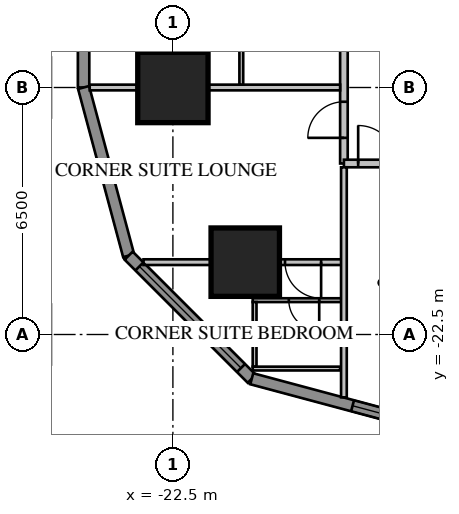
"""IFC4 building model, lengths in metres.
Left out: names, types, materials, properties, quantities, classifications, styles, units other than length and angle.
Written with IfcOpenShell. Run it as: python <this file> out.ifc"""

import sys

from ifc_helpers import new_model, si_unit, direction, frame, frame_2d, origin, origin_2d, place, context, subcontext, project, spatial, rectangle, extrude, element, fill, save


model = new_model("IFC4")
c1 = context("Model", 3, precision=1e-05, world=origin(), true_north=direction((0.0, 1.0)))
c2 = subcontext(c1, "Body", "Model", "MODEL_VIEW")
j1 = project(units=[si_unit("LENGTHUNIT", "METRE"), si_unit("PLANEANGLEUNIT", "RADIAN")], contexts=[c1])
p1 = place(None, origin())
s1 = spatial("IfcSite", under=j1, at=p1, CompositionType="ELEMENT")
p2 = place(p1, origin())
s2 = spatial("IfcBuilding", under=s1, at=p2, CompositionType="ELEMENT")
p3 = place(p2, frame((0.0, 0.0, 42.95)))
s3 = spatial("IfcBuildingStorey", under=s2, at=p3, CompositionType="ELEMENT", Elevation=42.95)
p4 = place(p3, frame((-22.5, -16.0, 0.0), z_axis=(0.0, 0.0, 1.0), x_axis=(1.0, 0.0, 0.0)))
e1 = element("IfcColumn", 1, at=p4, inside=s3, PredefinedType="COLUMN", context=c2, shape_type="SweptSolid", body=[
    extrude(rectangle(XDim=1.85, YDim=1.85, at=origin_2d()), origin(), (0.0, 0.0, 1.0), 3.85),
])
p5 = place(p3, frame((-20.596, -20.596, 0.0), z_axis=(0.0, 0.0, 1.0), x_axis=(1.0, 0.0, 0.0)))
e2 = element("IfcColumn", 2, at=p5, inside=s3, PredefinedType="COLUMN", context=c2, shape_type="SweptSolid", body=[
    extrude(rectangle(XDim=1.8, YDim=1.8, at=origin_2d()), origin(), (0.0, 0.0, 1.0), 3.85),
])
p6 = place(p3, frame((-24.85, 16.0, 0.0), z_axis=(0.0, 0.0, 1.0), x_axis=(0.0, -1.0, 0.0)))
e3 = element("IfcWall", 3, at=p6, inside=s3, PredefinedType="SOLIDWALL", context=c2, shape_type="SweptSolid", body=[
    extrude(rectangle(XDim=32.0, YDim=0.3, at=frame_2d((16.0, 0.0))), origin(), (0.0, 0.0, 1.0), 3.65),
])
p7 = place(p6, frame((1.2, 0.0, 0.75)))
e4 = element("IfcOpeningElement", 4, at=p7, cuts=e3, PredefinedType="OPENING", context=c2, shape_type="SweptSolid", body=[
    extrude(rectangle(XDim=1.6, YDim=1.8, at=frame_2d((0.8, 0.9))), frame((0.0, 0.17, 0.0), z_axis=(0.0, -1.0, 0.0), x_axis=(1.0, 0.0, 0.0)), (0.0, 0.0, 1.0), 0.34),
])
p8 = place(p6, frame((5.2, 0.0, 0.75)))
e5 = element("IfcOpeningElement", 5, at=p8, cuts=e3, PredefinedType="OPENING", context=c2, shape_type="SweptSolid", body=[
    extrude(rectangle(XDim=1.6, YDim=1.8, at=frame_2d((0.8, 0.9))), frame((0.0, 0.17, 0.0), z_axis=(0.0, -1.0, 0.0), x_axis=(1.0, 0.0, 0.0)), (0.0, 0.0, 1.0), 0.34),
])
p9 = place(p6, frame((17.2, 0.0, 0.75)))
e6 = element("IfcOpeningElement", 6, at=p9, cuts=e3, PredefinedType="OPENING", context=c2, shape_type="SweptSolid", body=[
    extrude(rectangle(XDim=1.6, YDim=1.8, at=frame_2d((0.8, 0.9))), frame((0.0, 0.17, 0.0), z_axis=(0.0, -1.0, 0.0), x_axis=(1.0, 0.0, 0.0)), (0.0, 0.0, 1.0), 0.34),
])
p10 = place(p6, frame((21.2, 0.0, 0.75)))
e7 = element("IfcOpeningElement", 7, at=p10, cuts=e3, PredefinedType="OPENING", context=c2, shape_type="SweptSolid", body=[
    extrude(rectangle(XDim=1.6, YDim=1.8, at=frame_2d((0.8, 0.9))), frame((0.0, 0.17, 0.0), z_axis=(0.0, -1.0, 0.0), x_axis=(1.0, 0.0, 0.0)), (0.0, 0.0, 1.0), 0.34),
])
p11 = place(p6, frame((25.2, 0.0, 0.75)))
e8 = element("IfcOpeningElement", 8, at=p11, cuts=e3, PredefinedType="OPENING", context=c2, shape_type="SweptSolid", body=[
    extrude(rectangle(XDim=1.6, YDim=1.8, at=frame_2d((0.8, 0.9))), frame((0.0, 0.17, 0.0), z_axis=(0.0, -1.0, 0.0), x_axis=(1.0, 0.0, 0.0)), (0.0, 0.0, 1.0), 0.34),
])
p12 = place(p6, frame((29.2, 0.0, 0.75)))
e9 = element("IfcOpeningElement", 9, at=p12, cuts=e3, PredefinedType="OPENING", context=c2, shape_type="SweptSolid", body=[
    extrude(rectangle(XDim=1.6, YDim=1.8, at=frame_2d((0.8, 0.9))), frame((0.0, 0.17, 0.0), z_axis=(0.0, -1.0, 0.0), x_axis=(1.0, 0.0, 0.0)), (0.0, 0.0, 1.0), 0.34),
])
p13 = place(p6, frame((8.8, 0.0, 0.75)))
e10 = element("IfcOpeningElement", 10, at=p13, cuts=e3, PredefinedType="OPENING", context=c2, shape_type="SweptSolid", body=[
    extrude(rectangle(XDim=2.4, YDim=1.8, at=frame_2d((1.2, 0.9))), frame((0.0, 0.17, 0.0), z_axis=(0.0, -1.0, 0.0), x_axis=(1.0, 0.0, 0.0)), (0.0, 0.0, 1.0), 0.34),
])
p14 = place(p6, frame((13.812, 0.0, 0.0)))
e11 = element("IfcOpeningElement", 11, at=p14, cuts=e3, PredefinedType="OPENING", context=c2, shape_type="SweptSolid", body=[
    extrude(rectangle(XDim=1.0, YDim=2.4, at=frame_2d((0.5, 1.2))), frame((0.0, 0.17, 0.0), z_axis=(0.0, -1.0, 0.0), x_axis=(1.0, 0.0, 0.0)), (0.0, 0.0, 1.0), 0.34),
])
p15 = place(p3, frame((-24.85, -16.0, 0.0), z_axis=(0.0, 0.0, 1.0), x_axis=(0.258839972501, -0.965920218567, 0.0)))
e12 = element("IfcWall", 12, at=p15, inside=s3, PredefinedType="SOLIDWALL", context=c2, shape_type="SweptSolid", body=[
    extrude(rectangle(XDim=4.581, YDim=0.3, at=frame_2d((2.291, 0.0))), origin(), (0.0, 0.0, 1.0), 3.65),
])
p16 = place(p3, frame((-23.664, -20.425, 0.0), z_axis=(0.0, 0.0, 1.0), x_axis=(0.707106781187, -0.707106781187, 0.0)))
e13 = element("IfcWall", 13, at=p16, inside=s3, PredefinedType="SOLIDWALL", context=c2, shape_type="SweptSolid", body=[
    extrude(rectangle(XDim=4.581, YDim=0.3, at=frame_2d((2.291, 0.0))), origin(), (0.0, 0.0, 1.0), 3.65),
])
p17 = place(p16, frame((0.4, 0.0, 0.75)))
e14 = element("IfcOpeningElement", 14, at=p17, cuts=e13, PredefinedType="OPENING", context=c2, shape_type="SweptSolid", body=[
    extrude(rectangle(XDim=3.781, YDim=1.8, at=frame_2d((1.891, 0.9))), frame((0.0, 0.17, 0.0), z_axis=(0.0, -1.0, 0.0), x_axis=(1.0, 0.0, 0.0)), (0.0, 0.0, 1.0), 0.34),
])
p18 = place(p3, frame((-20.425, -23.664, 0.0), z_axis=(0.0, 0.0, 1.0), x_axis=(0.965920218567, -0.258839972501, 0.0)))
e15 = element("IfcWall", 15, at=p18, inside=s3, PredefinedType="SOLIDWALL", context=c2, shape_type="SweptSolid", body=[
    extrude(rectangle(XDim=4.581, YDim=0.3, at=frame_2d((2.291, 0.0))), origin(), (0.0, 0.0, 1.0), 3.65),
])
p19 = place(p18, frame((2.746, 0.0, 0.75)))
e16 = element("IfcOpeningElement", 16, at=p19, cuts=e15, PredefinedType="OPENING", context=c2, shape_type="SweptSolid", body=[
    extrude(rectangle(XDim=1.6, YDim=1.8, at=frame_2d((0.8, 0.9))), frame((0.0, 0.17, 0.0), z_axis=(0.0, -1.0, 0.0), x_axis=(1.0, 0.0, 0.0)), (0.0, 0.0, 1.0), 0.34),
])
p20 = place(p3, frame((-18.0, 18.0, 0.0), z_axis=(0.0, 0.0, 1.0), x_axis=(0.0, -1.0, 0.0)))
e17 = element("IfcWall", 17, at=p20, inside=s3, PredefinedType="PARTITIONING", context=c2, shape_type="SweptSolid", body=[
    extrude(rectangle(XDim=36.0, YDim=0.2, at=frame_2d((18.0, 0.0))), origin(), (0.0, 0.0, 1.0), 3.65),
])
p21 = place(p20, frame((0.375, 0.0, 0.0)))
e18 = element("IfcOpeningElement", 18, at=p21, cuts=e17, PredefinedType="OPENING", context=c2, shape_type="SweptSolid", body=[
    extrude(rectangle(XDim=1.0, YDim=2.1, at=frame_2d((0.5, 1.05))), frame((0.0, 0.12, 0.0), z_axis=(0.0, -1.0, 0.0), x_axis=(1.0, 0.0, 0.0)), (0.0, 0.0, 1.0), 0.24),
])
p22 = place(p20, frame((2.375, 0.0, 0.0)))
e19 = element("IfcOpeningElement", 19, at=p22, cuts=e17, PredefinedType="OPENING", context=c2, shape_type="SweptSolid", body=[
    extrude(rectangle(XDim=0.95, YDim=2.1, at=frame_2d((0.475, 1.05))), frame((0.0, 0.12, 0.0), z_axis=(0.0, -1.0, 0.0), x_axis=(1.0, 0.0, 0.0)), (0.0, 0.0, 1.0), 0.24),
])
p23 = place(p20, frame((7.95, 0.0, 0.0)))
e20 = element("IfcOpeningElement", 20, at=p23, cuts=e17, PredefinedType="OPENING", context=c2, shape_type="SweptSolid", body=[
    extrude(rectangle(XDim=0.95, YDim=2.1, at=frame_2d((0.475, 1.05))), frame((0.0, 0.12, 0.0), z_axis=(0.0, -1.0, 0.0), x_axis=(1.0, 0.0, 0.0)), (0.0, 0.0, 1.0), 0.24),
])
p24 = place(p20, frame((18.375, 0.0, 0.0)))
e21 = element("IfcOpeningElement", 21, at=p24, cuts=e17, PredefinedType="OPENING", context=c2, shape_type="SweptSolid", body=[
    extrude(rectangle(XDim=0.95, YDim=2.1, at=frame_2d((0.475, 1.05))), frame((0.0, 0.12, 0.0), z_axis=(0.0, -1.0, 0.0), x_axis=(1.0, 0.0, 0.0)), (0.0, 0.0, 1.0), 0.24),
])
p25 = place(p20, frame((23.95, 0.0, 0.0)))
e22 = element("IfcOpeningElement", 22, at=p25, cuts=e17, PredefinedType="OPENING", context=c2, shape_type="SweptSolid", body=[
    extrude(rectangle(XDim=0.95, YDim=2.1, at=frame_2d((0.475, 1.05))), frame((0.0, 0.12, 0.0), z_axis=(0.0, -1.0, 0.0), x_axis=(1.0, 0.0, 0.0)), (0.0, 0.0, 1.0), 0.24),
])
p26 = place(p20, frame((26.375, 0.0, 0.0)))
e23 = element("IfcOpeningElement", 23, at=p26, cuts=e17, PredefinedType="OPENING", context=c2, shape_type="SweptSolid", body=[
    extrude(rectangle(XDim=0.95, YDim=2.1, at=frame_2d((0.475, 1.05))), frame((0.0, 0.12, 0.0), z_axis=(0.0, -1.0, 0.0), x_axis=(1.0, 0.0, 0.0)), (0.0, 0.0, 1.0), 0.24),
])
p27 = place(p20, frame((31.95, 0.0, 0.0)))
e24 = element("IfcOpeningElement", 24, at=p27, cuts=e17, PredefinedType="OPENING", context=c2, shape_type="SweptSolid", body=[
    extrude(rectangle(XDim=0.95, YDim=2.1, at=frame_2d((0.475, 1.05))), frame((0.0, 0.12, 0.0), z_axis=(0.0, -1.0, 0.0), x_axis=(1.0, 0.0, 0.0)), (0.0, 0.0, 1.0), 0.24),
])
p28 = place(p20, frame((34.375, 0.0, 0.0)))
e25 = element("IfcOpeningElement", 25, at=p28, cuts=e17, PredefinedType="OPENING", context=c2, shape_type="SweptSolid", body=[
    extrude(rectangle(XDim=0.95, YDim=2.1, at=frame_2d((0.475, 1.05))), frame((0.0, 0.12, 0.0), z_axis=(0.0, -1.0, 0.0), x_axis=(1.0, 0.0, 0.0)), (0.0, 0.0, 1.0), 0.24),
])
p29 = place(p20, frame((11.2, 0.0, 0.0)))
e26 = element("IfcOpeningElement", 26, at=p29, cuts=e17, PredefinedType="OPENING", context=c2, shape_type="SweptSolid", body=[
    extrude(rectangle(XDim=1.0, YDim=2.1, at=frame_2d((0.5, 1.05))), frame((0.0, 0.12, 0.0), z_axis=(0.0, -1.0, 0.0), x_axis=(1.0, 0.0, 0.0)), (0.0, 0.0, 1.0), 0.24),
])
p30 = place(p3, frame((-18.1, -16.0, 0.0), z_axis=(0.0, 0.0, 1.0), x_axis=(-1.0, 0.0, 0.0)))
e27 = element("IfcWall", 27, at=p30, inside=s3, PredefinedType="PARTITIONING", context=c2, shape_type="SweptSolid", body=[
    extrude(rectangle(XDim=6.589, YDim=0.15, at=frame_2d((3.295, 0.0))), origin(), (0.0, 0.0, 1.0), 3.65),
])
p31 = place(p3, frame((-18.065, -21.596, 0.0), z_axis=(0.0, 0.0, 1.0), x_axis=(-1.0, 0.0, 0.0)))
e28 = element("IfcWall", 28, at=p31, inside=s3, PredefinedType="PARTITIONING", context=c2, shape_type="SweptSolid", body=[
    extrude(rectangle(XDim=2.335, YDim=0.1, at=frame_2d((1.167, 0.0))), origin(), (0.0, 0.0, 1.0), 3.65),
])
p32 = place(p31, frame((0.585, 0.0, 0.0)))
e29 = element("IfcOpeningElement", 29, at=p32, cuts=e28, PredefinedType="OPENING", context=c2, shape_type="SweptSolid", body=[
    extrude(rectangle(XDim=0.8, YDim=2.1, at=frame_2d((0.4, 1.05))), frame((0.0, 0.07, 0.0), z_axis=(0.0, -1.0, 0.0), x_axis=(1.0, 0.0, 0.0)), (0.0, 0.0, 1.0), 0.14),
])
p33 = place(p3, frame((-20.35, -21.646, 0.0), z_axis=(0.0, 0.0, 1.0), x_axis=(0.0, -1.0, 0.0)))
e30 = element("IfcWall", 30, at=p33, inside=s3, PredefinedType="PARTITIONING", context=c2, shape_type="SweptSolid", body=[
    extrude(rectangle(XDim=1.7, YDim=0.1, at=frame_2d((0.85, 0.0))), origin(), (0.0, 0.0, 1.0), 3.65),
])
p34 = place(p3, frame((-18.1, -23.396, 0.0), z_axis=(0.0, 0.0, 1.0), x_axis=(-1.0, 0.0, 0.0)))
e31 = element("IfcWall", 31, at=p34, inside=s3, PredefinedType="PARTITIONING", context=c2, shape_type="SweptSolid", body=[
    extrude(rectangle(XDim=2.3, YDim=0.1, at=frame_2d((1.15, 0.0))), origin(), (0.0, 0.0, 1.0), 3.65),
])
p35 = place(p3, frame((-18.065, -20.596, 0.0), z_axis=(0.0, 0.0, 1.0), x_axis=(-1.0, 0.0, 0.0)))
e32 = element("IfcWall", 32, at=p35, inside=s3, PredefinedType="PARTITIONING", context=c2, shape_type="SweptSolid", body=[
    extrude(rectangle(XDim=5.209, YDim=0.15, at=frame_2d((2.604, 0.0))), origin(), (0.0, 0.0, 1.0), 3.65),
])
p36 = place(p35, frame((0.535, 0.0, 0.0)))
e33 = element("IfcOpeningElement", 33, at=p36, cuts=e32, PredefinedType="OPENING", context=c2, shape_type="SweptSolid", body=[
    extrude(rectangle(XDim=0.95, YDim=2.1, at=frame_2d((0.475, 1.05))), frame((0.0, 0.095, 0.0), z_axis=(0.0, -1.0, 0.0), x_axis=(1.0, 0.0, 0.0)), (0.0, 0.0, 1.0), 0.19),
])
p37 = place(p3, frame((-18.0, -18.0, 0.0), z_axis=(0.0, 0.0, 1.0), x_axis=(1.0, 0.0, 0.0)))
e34 = element("IfcWall", 34, at=p37, inside=s3, PredefinedType="PARTITIONING", context=c2, shape_type="SweptSolid", body=[
    extrude(rectangle(XDim=36.0, YDim=0.2, at=frame_2d((18.0, 0.0))), origin(), (0.0, 0.0, 1.0), 3.65),
])
p38 = place(p37, frame((0.375, 0.0, 0.0)))
e35 = element("IfcOpeningElement", 35, at=p38, cuts=e34, PredefinedType="OPENING", context=c2, shape_type="SweptSolid", body=[
    extrude(rectangle(XDim=1.0, YDim=2.1, at=frame_2d((0.5, 1.05))), frame((0.0, 0.12, 0.0), z_axis=(0.0, -1.0, 0.0), x_axis=(1.0, 0.0, 0.0)), (0.0, 0.0, 1.0), 0.24),
])
p39 = place(p37, frame((2.45, 0.0, 0.0)))
e36 = element("IfcOpeningElement", 36, at=p39, cuts=e34, PredefinedType="OPENING", context=c2, shape_type="SweptSolid", body=[
    extrude(rectangle(XDim=0.8, YDim=2.1, at=frame_2d((0.4, 1.05))), frame((0.0, 0.12, 0.0), z_axis=(0.0, -1.0, 0.0), x_axis=(1.0, 0.0, 0.0)), (0.0, 0.0, 1.0), 0.24),
])
p40 = place(p37, frame((4.05, 0.0, 0.0)))
e37 = element("IfcOpeningElement", 37, at=p40, cuts=e34, PredefinedType="OPENING", context=c2, shape_type="SweptSolid", body=[
    extrude(rectangle(XDim=1.0, YDim=2.1, at=frame_2d((0.5, 1.05))), frame((0.0, 0.12, 0.0), z_axis=(0.0, -1.0, 0.0), x_axis=(1.0, 0.0, 0.0)), (0.0, 0.0, 1.0), 0.24),
])
p41 = place(p37, frame((6.45, 0.0, 0.0)))
e38 = element("IfcOpeningElement", 38, at=p41, cuts=e34, PredefinedType="OPENING", context=c2, shape_type="SweptSolid", body=[
    extrude(rectangle(XDim=0.9, YDim=2.1, at=frame_2d((0.45, 1.05))), frame((0.0, 0.12, 0.0), z_axis=(0.0, -1.0, 0.0), x_axis=(1.0, 0.0, 0.0)), (0.0, 0.0, 1.0), 0.24),
])
p42 = place(p37, frame((8.15, 0.0, 0.0)))
e39 = element("IfcOpeningElement", 39, at=p42, cuts=e34, PredefinedType="OPENING", context=c2, shape_type="SweptSolid", body=[
    extrude(rectangle(XDim=1.0, YDim=2.1, at=frame_2d((0.5, 1.05))), frame((0.0, 0.12, 0.0), z_axis=(0.0, -1.0, 0.0), x_axis=(1.0, 0.0, 0.0)), (0.0, 0.0, 1.0), 0.24),
])
p43 = place(p37, frame((19.95, 0.0, 0.0)))
e40 = element("IfcOpeningElement", 40, at=p43, cuts=e34, PredefinedType="OPENING", context=c2, shape_type="SweptSolid", body=[
    extrude(rectangle(XDim=0.95, YDim=2.1, at=frame_2d((0.475, 1.05))), frame((0.0, 0.12, 0.0), z_axis=(0.0, -1.0, 0.0), x_axis=(1.0, 0.0, 0.0)), (0.0, 0.0, 1.0), 0.24),
])
p44 = place(p37, frame((23.95, 0.0, 0.0)))
e41 = element("IfcOpeningElement", 41, at=p44, cuts=e34, PredefinedType="OPENING", context=c2, shape_type="SweptSolid", body=[
    extrude(rectangle(XDim=0.95, YDim=2.1, at=frame_2d((0.475, 1.05))), frame((0.0, 0.12, 0.0), z_axis=(0.0, -1.0, 0.0), x_axis=(1.0, 0.0, 0.0)), (0.0, 0.0, 1.0), 0.24),
])
p45 = place(p37, frame((27.95, 0.0, 0.0)))
e42 = element("IfcOpeningElement", 42, at=p45, cuts=e34, PredefinedType="OPENING", context=c2, shape_type="SweptSolid", body=[
    extrude(rectangle(XDim=0.95, YDim=2.1, at=frame_2d((0.475, 1.05))), frame((0.0, 0.12, 0.0), z_axis=(0.0, -1.0, 0.0), x_axis=(1.0, 0.0, 0.0)), (0.0, 0.0, 1.0), 0.24),
])
p46 = place(p37, frame((31.95, 0.0, 0.0)))
e43 = element("IfcOpeningElement", 43, at=p46, cuts=e34, PredefinedType="OPENING", context=c2, shape_type="SweptSolid", body=[
    extrude(rectangle(XDim=0.95, YDim=2.1, at=frame_2d((0.475, 1.05))), frame((0.0, 0.12, 0.0), z_axis=(0.0, -1.0, 0.0), x_axis=(1.0, 0.0, 0.0)), (0.0, 0.0, 1.0), 0.24),
])
p47 = place(p37, frame((34.375, 0.0, 0.0)))
e44 = element("IfcOpeningElement", 44, at=p47, cuts=e34, PredefinedType="OPENING", context=c2, shape_type="SweptSolid", body=[
    extrude(rectangle(XDim=0.95, YDim=2.1, at=frame_2d((0.475, 1.05))), frame((0.0, 0.12, 0.0), z_axis=(0.0, -1.0, 0.0), x_axis=(1.0, 0.0, 0.0)), (0.0, 0.0, 1.0), 0.24),
])
p48 = place(p37, frame((11.2, 0.0, 0.0)))
e45 = element("IfcOpeningElement", 45, at=p48, cuts=e34, PredefinedType="OPENING", context=c2, shape_type="SweptSolid", body=[
    extrude(rectangle(XDim=1.0, YDim=2.1, at=frame_2d((0.5, 1.05))), frame((0.0, 0.12, 0.0), z_axis=(0.0, -1.0, 0.0), x_axis=(1.0, 0.0, 0.0)), (0.0, 0.0, 1.0), 0.24),
])
p49 = place(p3, frame((-18.0, -18.1, 0.0), z_axis=(0.0, 0.0, 1.0), x_axis=(0.0, -1.0, 0.0)))
e46 = element("IfcWall", 46, at=p49, inside=s3, PredefinedType="PARTITIONING", context=c2, shape_type="SweptSolid", body=[
    extrude(rectangle(XDim=6.053, YDim=0.15, at=frame_2d((3.027, 0.0))), origin(), (0.0, 0.0, 1.0), 3.65),
])
p50 = place(p3, frame((-20.7, -12.075, 0.0), z_axis=(0.0, 0.0, 1.0), x_axis=(0.0, -1.0, 0.0)))
e47 = element("IfcWall", 47, at=p50, inside=s3, PredefinedType="PARTITIONING", context=c2, shape_type="SweptSolid", body=[
    extrude(rectangle(XDim=3.85, YDim=0.1, at=frame_2d((1.925, 0.0))), origin(), (0.0, 0.0, 1.0), 3.65),
])
p51 = place(p50, frame((1.75, 0.0, 0.0)))
e48 = element("IfcOpeningElement", 48, at=p51, cuts=e47, PredefinedType="OPENING", context=c2, shape_type="SweptSolid", body=[
    extrude(rectangle(XDim=0.9, YDim=2.1, at=frame_2d((0.45, 1.05))), frame((0.0, 0.07, 0.0), z_axis=(0.0, -1.0, 0.0), x_axis=(1.0, 0.0, 0.0)), (0.0, 0.0, 1.0), 0.14),
])
p52 = place(p17, origin())
e49 = element("IfcWindow", 49, at=p52, inside=s3, PartitioningType="SINGLE_PANEL", PredefinedType="WINDOW", context=c2, shape_type="SweptSolid", body=[
    extrude(rectangle(XDim=3.781, YDim=1.8, at=frame_2d((1.891, 0.9))), frame((0.0, 0.03, 0.0), z_axis=(0.0, -1.0, 0.0), x_axis=(1.0, 0.0, 0.0)), (0.0, 0.0, 1.0), 0.06),
])
fill(e14, e49)
p53 = place(p19, origin())
e50 = element("IfcWindow", 50, at=p53, inside=s3, PartitioningType="SINGLE_PANEL", PredefinedType="WINDOW", context=c2, shape_type="SweptSolid", body=[
    extrude(rectangle(XDim=1.6, YDim=1.8, at=frame_2d((0.8, 0.9))), frame((0.0, 0.03, 0.0), z_axis=(0.0, -1.0, 0.0), x_axis=(1.0, 0.0, 0.0)), (0.0, 0.0, 1.0), 0.06),
])
fill(e16, e50)
p54 = place(p28, origin())
e51 = element("IfcDoor", 51, at=p54, inside=s3, OperationType="SINGLE_SWING_RIGHT", PredefinedType="DOOR", context=c2, shape_type="SweptSolid", body=[
    extrude(rectangle(XDim=0.95, YDim=2.1, at=frame_2d((0.475, 1.05))), frame((0.0, 0.025, 0.0), z_axis=(0.0, -1.0, 0.0), x_axis=(1.0, 0.0, 0.0)), (0.0, 0.0, 1.0), 0.05),
])
fill(e25, e51)
p55 = place(p32, origin())
e52 = element("IfcDoor", 52, at=p55, inside=s3, OperationType="SINGLE_SWING_LEFT", PredefinedType="DOOR", context=c2, shape_type="SweptSolid", body=[
    extrude(rectangle(XDim=0.8, YDim=2.1, at=frame_2d((0.4, 1.05))), frame((0.0, 0.025, 0.0), z_axis=(0.0, -1.0, 0.0), x_axis=(1.0, 0.0, 0.0)), (0.0, 0.0, 1.0), 0.05),
])
fill(e29, e52)
p56 = place(p36, origin())
e53 = element("IfcDoor", 53, at=p56, inside=s3, OperationType="SINGLE_SWING_LEFT", PredefinedType="DOOR", context=c2, shape_type="SweptSolid", body=[
    extrude(rectangle(XDim=0.95, YDim=2.1, at=frame_2d((0.475, 1.05))), frame((0.0, 0.025, 0.0), z_axis=(0.0, -1.0, 0.0), x_axis=(1.0, 0.0, 0.0)), (0.0, 0.0, 1.0), 0.05),
])
fill(e33, e53)
p57 = place(p38, origin())
e54 = element("IfcDoor", 54, at=p57, inside=s3, OperationType="SINGLE_SWING_LEFT", PredefinedType="DOOR", context=c2, shape_type="SweptSolid", body=[
    extrude(rectangle(XDim=1.0, YDim=2.1, at=frame_2d((0.5, 1.05))), frame((0.0, 0.025, 0.0), z_axis=(0.0, -1.0, 0.0), x_axis=(1.0, 0.0, 0.0)), (0.0, 0.0, 1.0), 0.05),
])
fill(e35, e54)
save(model, sys.argv[1])
